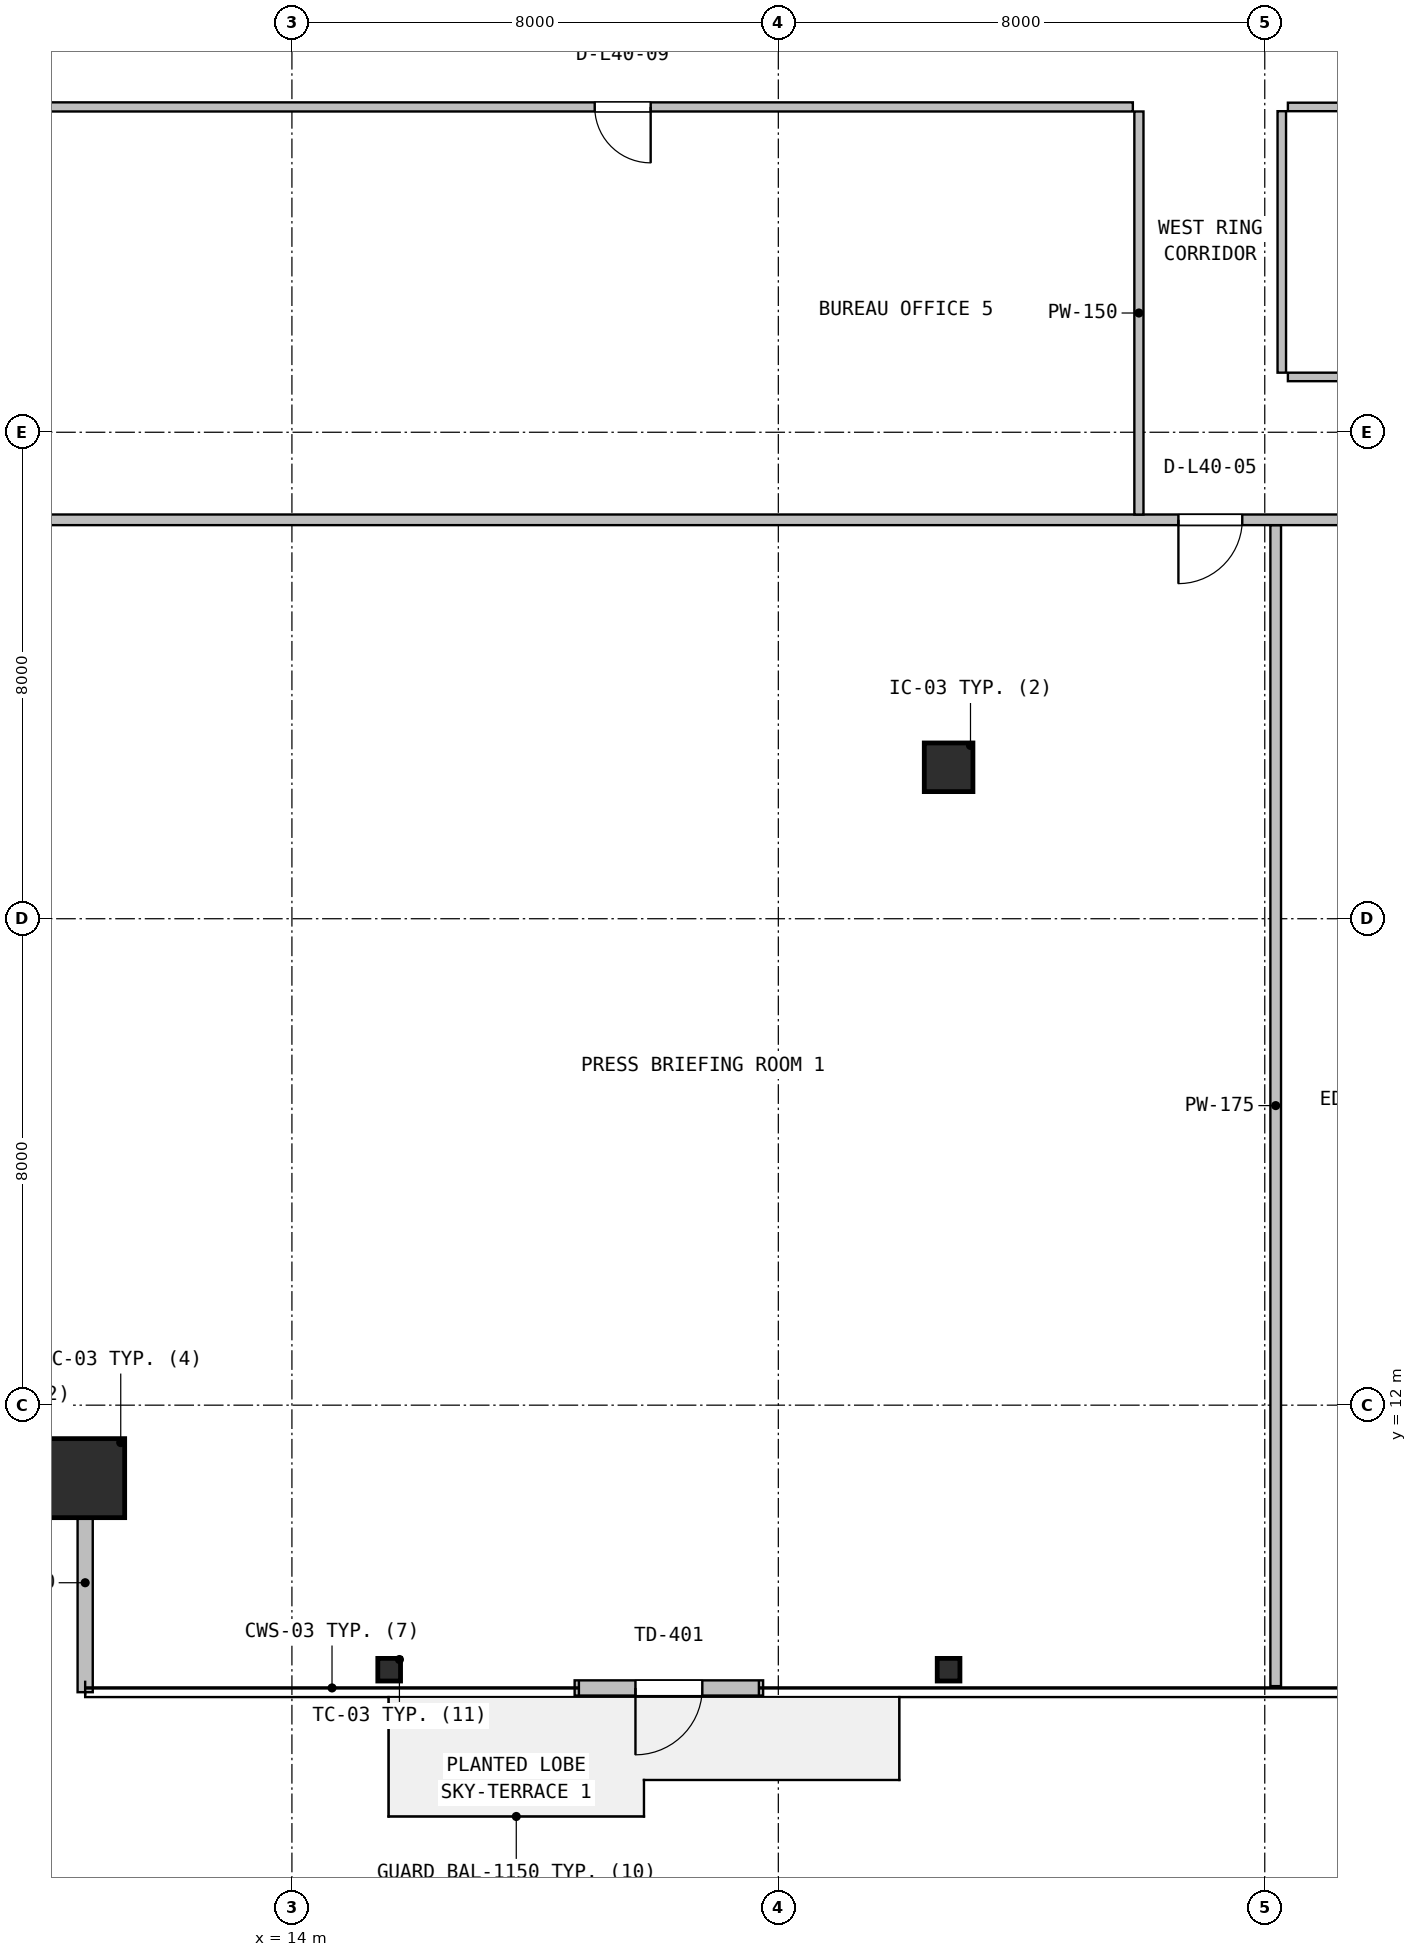
"""IFC4 building model, lengths in metres.
Left out: names, types, materials, properties, quantities, classifications, styles, units other than length and angle.
Written with IfcOpenShell. Run it as: python <this file> out.ifc"""

import sys

from ifc_helpers import new_model, si_unit, direction, frame, frame_2d, origin, origin_2d, place, context, subcontext, project, spatial, rectangle, hollow_rectangle, i_section, extrude, source, transform, mapped, element, fill, save


model = new_model("IFC4")
c1 = context("Model", 3, precision=1e-05, world=origin(), true_north=direction((0.0, 1.0)))
c2 = subcontext(c1, "Body", "Model", "MODEL_VIEW")
j1 = project(units=[si_unit("LENGTHUNIT", "METRE"), si_unit("PLANEANGLEUNIT", "RADIAN")], contexts=[c1])
p1 = place(None, origin())
s1 = spatial("IfcSite", under=j1, at=p1, CompositionType="ELEMENT")
p2 = place(p1, origin())
s2 = spatial("IfcBuilding", under=s1, at=p2, CompositionType="ELEMENT")
p3 = place(p2, frame((0.0, 0.0, 164.8)))
s3 = spatial("IfcBuildingStorey", under=s2, at=p3, CompositionType="ELEMENT", Elevation=164.8)
m1 = source(origin(), c2, "Body", "SweptSolid", [
    extrude(hollow_rectangle(XDim=1.3, YDim=1.3, WallThickness=0.05, at=origin_2d()), origin(), (0.0, 0.0, 1.0), 3.8),
])
p4 = place(p3, frame((10.6, 10.8, 0.0), z_axis=(0.0, 0.0, 1.0), x_axis=(1.0, 0.0, 0.0)))
e1 = element("IfcColumn", 1, at=p4, inside=s3, PredefinedType="COLUMN", context=c2, shape_type="MappedRepresentation", body=[
    mapped(m1, transform((0.0, 0.0, 0.0), x_axis=(1.0, 0.0, 0.0), y_axis=(0.0, 1.0, 0.0), z_axis=(0.0, 0.0, 1.0), scale=1.0)),
])
m2 = source(origin(), c2, "Body", "SweptSolid", [
    extrude(i_section(OverallWidth=0.374, OverallDepth=0.372, WebThickness=0.016, FlangeThickness=0.026, FilletRadius=0.016, at=origin_2d()), origin(), (0.0, 0.0, 1.0), 3.8),
])
for number, where, z_axis, x_axis in (
    (2, (15.6, 7.65, 0.0), (0.0, 0.0, 1.0), (1.0, 0.0, 0.0)),
    (3, (24.8, 7.65, 0.0), (0.0, 0.0, 1.0), (1.0, 0.0, 0.0)),
):
    element("IfcColumn", number, at=place(p3, frame(where, z_axis=z_axis, x_axis=x_axis)), inside=s3, PredefinedType="COLUMN", context=c2, shape_type="MappedRepresentation", body=[
        mapped(m2, transform((0.0, 0.0, 0.0), x_axis=(1.0, 0.0, 0.0), y_axis=(0.0, 1.0, 0.0), z_axis=(0.0, 0.0, 1.0), scale=1.0)),
    ])
m3 = source(origin(), c2, "Body", "SweptSolid", [
    extrude(rectangle(XDim=0.8, YDim=0.8, at=origin_2d()), origin(), (0.0, 0.0, 1.0), 3.8),
])
p5 = place(p3, frame((24.8, 22.49, 0.0), z_axis=(0.0, 0.0, 1.0), x_axis=(1.0, 0.0, 0.0)))
e4 = element("IfcColumn", 4, at=p5, inside=s3, PredefinedType="COLUMN", context=c2, shape_type="MappedRepresentation", body=[
    mapped(m3, transform((0.0, 0.0, 0.0), x_axis=(1.0, 0.0, 0.0), y_axis=(0.0, 1.0, 0.0), z_axis=(0.0, 0.0, 1.0), scale=1.0)),
])
p6 = place(p3, frame((18.65, 7.35, 0.0), z_axis=(0.0, 0.0, 1.0), x_axis=(1.0, 0.0, 0.0)))
e5 = element("IfcWall", 5, at=p6, inside=s3, PredefinedType="SOLIDWALL", context=c2, shape_type="SweptSolid", body=[
    extrude(rectangle(XDim=3.1, YDim=0.25, at=frame_2d((1.55, 0.0))), origin(), (0.0, 0.0, 1.0), 3.53),
])
p7 = place(p6, frame((1.0, 0.0, 0.0)))
e6 = element("IfcOpeningElement", 6, at=p7, cuts=e5, PredefinedType="OPENING", context=c2, shape_type="SweptSolid", body=[
    extrude(rectangle(XDim=1.1, YDim=2.15, at=frame_2d((0.55, 1.075))), frame((0.0, 0.135, 0.0), z_axis=(0.0, -1.0, 0.0), x_axis=(1.0, 0.0, 0.0)), (0.0, 0.0, 1.0), 0.27),
])
p8 = place(p3, frame((10.6, 7.28, 0.0), z_axis=(0.0, 0.0, 1.0), x_axis=(0.0, 1.0, 0.0)))
e7 = element("IfcWall", 7, at=p8, inside=s3, PredefinedType="SOLIDWALL", context=c2, shape_type="SweptSolid", body=[
    extrude(rectangle(XDim=3.6, YDim=0.25, at=frame_2d((1.8, 0.0))), origin(), (0.0, 0.0, 1.0), 3.108),
])
p9 = place(p3, frame((30.18, 7.38, 0.0), z_axis=(0.0, 0.0, 1.0), x_axis=(0.0, 1.0, 0.0)))
e8 = element("IfcWall", 8, at=p9, inside=s3, PredefinedType="PARTITIONING", context=c2, shape_type="SweptSolid", body=[
    extrude(rectangle(XDim=19.093, YDim=0.175, at=frame_2d((9.546, 0.0))), origin(), (0.0, 0.0, 1.0), 2.909),
])
p10 = place(p3, frame((7.18, 26.56, 0.0), z_axis=(0.0, 0.0, 1.0), x_axis=(1.0, 0.0, 0.0)))
e9 = element("IfcWall", 9, at=p10, inside=s3, PredefinedType="PARTITIONING", context=c2, shape_type="SweptSolid", body=[
    extrude(rectangle(XDim=53.64, YDim=0.175, at=frame_2d((26.82, 0.0))), origin(), (0.0, 0.0, 1.0), 2.909),
])
p11 = place(p10, frame((21.4, 0.0, 0.0)))
e10 = element("IfcOpeningElement", 10, at=p11, cuts=e9, PredefinedType="OPENING", context=c2, shape_type="SweptSolid", body=[
    extrude(rectangle(XDim=1.05, YDim=2.1, at=frame_2d((0.525, 1.05))), frame((0.0, 0.098, 0.0), z_axis=(0.0, -1.0, 0.0), x_axis=(1.0, 0.0, 0.0)), (0.0, 0.0, 1.0), 0.195),
])
p12 = place(p10, frame((25.205, 0.0, 0.0)))
e11 = element("IfcOpeningElement", 11, at=p12, cuts=e9, PredefinedType="OPENING", context=c2, shape_type="SweptSolid", body=[
    extrude(rectangle(XDim=1.05, YDim=2.1, at=frame_2d((0.525, 1.05))), frame((0.0, 0.098, 0.0), z_axis=(0.0, -1.0, 0.0), x_axis=(1.0, 0.0, 0.0)), (0.0, 0.0, 1.0), 0.195),
])
p13 = place(p10, frame((29.825, 0.0, 0.0)))
e12 = element("IfcOpeningElement", 12, at=p13, cuts=e9, PredefinedType="OPENING", context=c2, shape_type="SweptSolid", body=[
    extrude(rectangle(XDim=1.4, YDim=2.12, at=frame_2d((0.7, 1.06))), frame((0.0, 0.098, 0.0), z_axis=(0.0, -1.0, 0.0), x_axis=(1.0, 0.0, 0.0)), (0.0, 0.0, 1.0), 0.195),
])
p14 = place(p10, frame((33.425, 0.0, 0.0)))
e13 = element("IfcOpeningElement", 13, at=p14, cuts=e9, PredefinedType="OPENING", context=c2, shape_type="SweptSolid", body=[
    extrude(rectangle(XDim=0.88, YDim=2.06, at=frame_2d((0.44, 1.03))), frame((0.0, 0.098, 0.0), z_axis=(0.0, -1.0, 0.0), x_axis=(1.0, 0.0, 0.0)), (0.0, 0.0, 1.0), 0.195),
])
p15 = place(p3, frame((27.93, 26.647, 0.0), z_axis=(0.0, 0.0, 1.0), x_axis=(0.0, 1.0, 0.0)))
e14 = element("IfcWall", 14, at=p15, inside=s3, PredefinedType="PARTITIONING", context=c2, shape_type="SweptSolid", body=[
    extrude(rectangle(XDim=6.628, YDim=0.15, at=frame_2d((3.314, 0.0))), origin(), (0.0, 0.0, 1.0), 3.222),
])
p16 = place(p3, frame((7.18, 33.35, 0.0), z_axis=(0.0, 0.0, 1.0), x_axis=(1.0, 0.0, 0.0)))
e15 = element("IfcWall", 15, at=p16, inside=s3, PredefinedType="PARTITIONING", context=c2, shape_type="SweptSolid", body=[
    extrude(rectangle(XDim=20.65, YDim=0.15, at=frame_2d((10.325, 0.0))), origin(), (0.0, 0.0, 1.0), 2.909),
])
p17 = place(p16, frame((11.8, 0.0, 0.0)))
e16 = element("IfcOpeningElement", 16, at=p17, cuts=e15, PredefinedType="OPENING", context=c2, shape_type="SweptSolid", body=[
    extrude(rectangle(XDim=0.92, YDim=2.08, at=frame_2d((0.46, 1.04))), frame((0.0, 0.085, 0.0), z_axis=(0.0, -1.0, 0.0), x_axis=(1.0, 0.0, 0.0)), (0.0, 0.0, 1.0), 0.17),
])
p18 = place(p3, frame((30.38, 28.91, 0.0), z_axis=(0.0, 0.0, 1.0), x_axis=(1.0, 0.0, 0.0)))
e17 = element("IfcWall", 17, at=p18, inside=s3, PredefinedType="PARTITIONING", context=c2, shape_type="SweptSolid", body=[
    extrude(rectangle(XDim=9.39, YDim=0.14, at=frame_2d((4.695, 0.0))), origin(), (0.0, 0.0, 1.0), 2.909),
])
p19 = place(p18, frame((2.03, 0.0, 0.0)))
e18 = element("IfcOpeningElement", 18, at=p19, cuts=e17, PredefinedType="OPENING", context=c2, shape_type="SweptSolid", body=[
    extrude(rectangle(XDim=1.0, YDim=2.1, at=frame_2d((0.5, 1.05))), frame((0.0, 0.08, 0.0), z_axis=(0.0, -1.0, 0.0), x_axis=(1.0, 0.0, 0.0)), (0.0, 0.0, 1.0), 0.16),
])
p20 = place(p3, frame((30.38, 33.35, 0.0), z_axis=(0.0, 0.0, 1.0), x_axis=(1.0, 0.0, 0.0)))
e19 = element("IfcWall", 19, at=p20, inside=s3, PredefinedType="PARTITIONING", context=c2, shape_type="SweptSolid", body=[
    extrude(rectangle(XDim=9.39, YDim=0.14, at=frame_2d((4.695, 0.0))), origin(), (0.0, 0.0, 1.0), 2.909),
])
p21 = place(p3, frame((30.28, 28.98, 0.0), z_axis=(0.0, 0.0, 1.0), x_axis=(0.0, 1.0, 0.0)))
e20 = element("IfcWall", 20, at=p21, inside=s3, PredefinedType="PARTITIONING", context=c2, shape_type="SweptSolid", body=[
    extrude(rectangle(XDim=4.3, YDim=0.14, at=frame_2d((2.15, 0.0))), origin(), (0.0, 0.0, 1.0), 3.222),
])
m4 = source(origin(), c2, "Body", "SweptSolid", [
    extrude(rectangle(XDim=1.1, YDim=2.15, at=frame_2d((0.55, 1.075))), frame((0.0, 0.025, 0.0), z_axis=(0.0, -1.0, 0.0), x_axis=(1.0, 0.0, 0.0)), (0.0, 0.0, 1.0), 0.05),
])
p22 = place(p7, frame((1.1, 0.0, 0.0), z_axis=(0.0, 0.0, 1.0), x_axis=(-1.0, 0.0, 0.0)))
e21 = element("IfcDoor", 21, at=p22, inside=s3, OperationType="SINGLE_SWING_LEFT", PredefinedType="DOOR", context=c2, shape_type="MappedRepresentation", body=[
    mapped(m4, transform((0.0, 0.0, 0.0), x_axis=(1.0, 0.0, 0.0), y_axis=(0.0, 1.0, 0.0), z_axis=(0.0, 0.0, 1.0), scale=1.0)),
])
fill(e6, e21)
m5 = source(origin(), c2, "Body", "SweptSolid", [
    extrude(rectangle(XDim=1.05, YDim=2.1, at=frame_2d((0.525, 1.05))), frame((0.0, 0.025, 0.0), z_axis=(0.0, -1.0, 0.0), x_axis=(1.0, 0.0, 0.0)), (0.0, 0.0, 1.0), 0.05),
])
p23 = place(p11, frame((1.05, 0.0, 0.0), z_axis=(0.0, 0.0, 1.0), x_axis=(-1.0, 0.0, 0.0)))
e22 = element("IfcDoor", 22, at=p23, inside=s3, OperationType="SINGLE_SWING_LEFT", PredefinedType="DOOR", context=c2, shape_type="MappedRepresentation", body=[
    mapped(m5, transform((0.0, 0.0, 0.0), x_axis=(1.0, 0.0, 0.0), y_axis=(0.0, 1.0, 0.0), z_axis=(0.0, 0.0, 1.0), scale=1.0)),
])
fill(e10, e22)
m6 = source(origin(), c2, "Body", "SweptSolid", [
    extrude(rectangle(XDim=0.92, YDim=2.08, at=frame_2d((0.46, 1.04))), frame((0.0, 0.025, 0.0), z_axis=(0.0, -1.0, 0.0), x_axis=(1.0, 0.0, 0.0)), (0.0, 0.0, 1.0), 0.05),
])
p24 = place(p17, frame((0.92, 0.0, 0.0), z_axis=(0.0, 0.0, 1.0), x_axis=(-1.0, 0.0, 0.0)))
e23 = element("IfcDoor", 23, at=p24, inside=s3, OperationType="SINGLE_SWING_RIGHT", PredefinedType="DOOR", context=c2, shape_type="MappedRepresentation", body=[
    mapped(m6, transform((0.0, 0.0, 0.0), x_axis=(1.0, 0.0, 0.0), y_axis=(0.0, 1.0, 0.0), z_axis=(0.0, 0.0, 1.0), scale=1.0)),
])
fill(e16, e23)
save(model, sys.argv[1])
